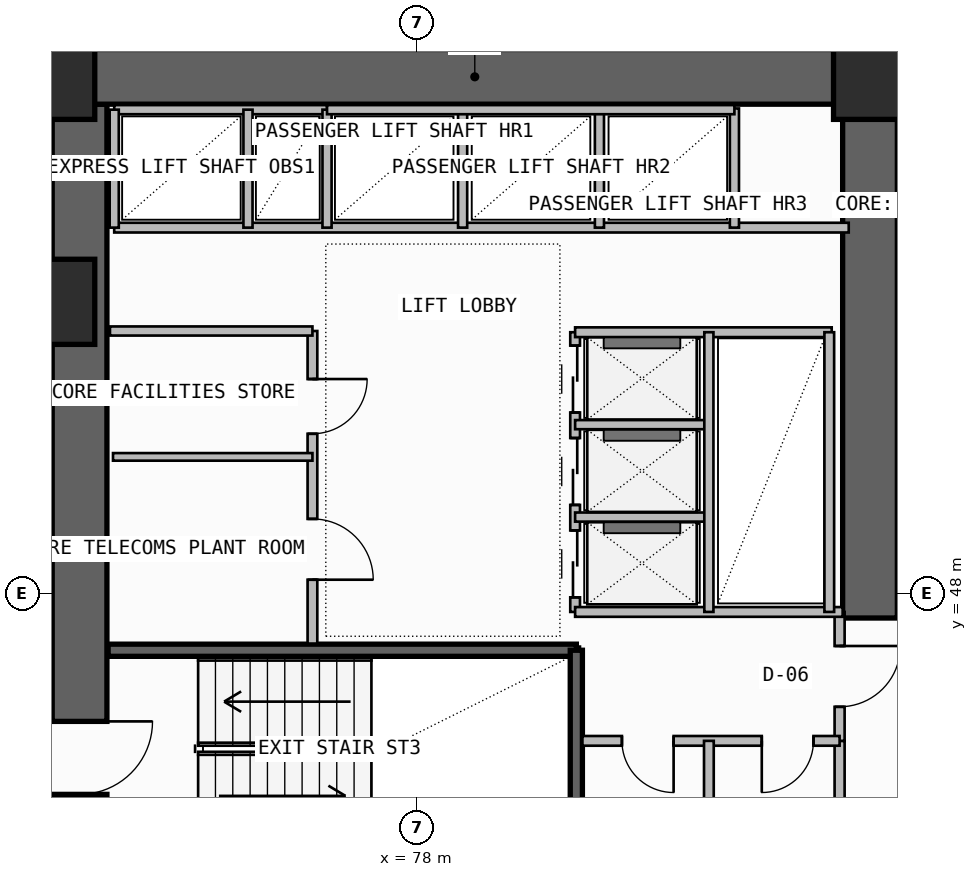
"""IFC4 building model, lengths in metres.
Left out: names, types, materials, properties, quantities, classifications, styles, units other than length and angle.
Written with IfcOpenShell. Run it as: python <this file> out.ifc"""

import sys

from ifc_helpers import new_model, si_unit, direction, frame, frame_2d, origin, origin_2d, place, context, subcontext, project, spatial, rectangle, extrude, element, fill, save


model = new_model("IFC4")
c1 = context("Model", 3, precision=1e-05, world=origin(), true_north=direction((0.0, 1.0)))
c2 = subcontext(c1, "Body", "Model", "MODEL_VIEW")
j1 = project(units=[si_unit("LENGTHUNIT", "METRE"), si_unit("PLANEANGLEUNIT", "RADIAN")], contexts=[c1])
p1 = place(None, origin())
s1 = spatial("IfcSite", under=j1, at=p1, CompositionType="ELEMENT")
p2 = place(p1, origin())
s2 = spatial("IfcBuilding", under=s1, at=p2, CompositionType="ELEMENT")
p3 = place(p2, frame((0.0, 0.0, 132.3)))
s3 = spatial("IfcBuildingStorey", under=s2, at=p3, CompositionType="ELEMENT", Elevation=132.3)
p4 = place(p3, frame((72.45, 43.35, -0.4), z_axis=(0.0, 0.0, 1.0), x_axis=(0.0, 1.0, 0.0)))
e1 = element("IfcWall", 1, at=p4, inside=s3, PredefinedType="SHEAR", context=c2, shape_type="SweptSolid", body=[
    extrude(rectangle(XDim=12.7, YDim=0.9, at=frame_2d((6.35, 0.0))), origin(), (0.0, 0.0, 1.0), 3.74),
])
p5 = place(p4, frame((1.35, 0.0, 0.4)))
e2 = element("IfcOpeningElement", 2, at=p5, cuts=e1, PredefinedType="OPENING", context=c2, shape_type="SweptSolid", body=[
    extrude(rectangle(XDim=1.2, YDim=2.2, at=frame_2d((0.6, 1.1))), frame((0.0, 0.46, 0.0), z_axis=(0.0, -1.0, 0.0), x_axis=(1.0, 0.0, 0.0)), (0.0, 0.0, 1.0), 0.92),
])
p6 = place(p3, frame((72.0, 56.5, -0.4), z_axis=(0.0, 0.0, 1.0), x_axis=(1.0, 0.0, 0.0)))
e3 = element("IfcWall", 3, at=p6, inside=s3, PredefinedType="SHEAR", context=c2, shape_type="SweptSolid", body=[
    extrude(rectangle(XDim=13.9, YDim=0.9, at=frame_2d((6.95, 0.0))), origin(), (0.0, 0.0, 1.0), 3.74),
])
p7 = place(p3, frame((85.45, 47.6, -0.4), z_axis=(0.0, 0.0, 1.0), x_axis=(0.0, 1.0, 0.0)))
e4 = element("IfcWall", 4, at=p7, inside=s3, PredefinedType="SHEAR", context=c2, shape_type="SweptSolid", body=[
    extrude(rectangle(XDim=8.45, YDim=0.9, at=frame_2d((4.225, 0.0))), origin(), (0.0, 0.0, 1.0), 3.74),
])
for number, where, z_axis, x_axis in (
    (5, (72.0, 52.8, 0.0), (0.0, 0.0, 1.0), (1.0, 0.0, 0.0)),
    (6, (72.0, 56.5, 0.0), (0.0, 0.0, 1.0), (1.0, 0.0, 0.0)),
    (7, (85.55, 56.5, 0.0), (0.0, 0.0, 1.0), (1.0, 0.0, 0.0)),
):
    element("IfcColumn", number, at=place(p3, frame(where, z_axis=z_axis, x_axis=x_axis)), inside=s3, PredefinedType="COLUMN", context=c2, shape_type="SweptSolid", body=[
        extrude(rectangle(XDim=1.4, YDim=1.4, at=origin_2d()), origin(), (0.0, 0.0, 1.0), 3.6),
    ])
p8 = place(p3, frame((72.92, 47.07, -0.4), z_axis=(0.0, 0.0, 1.0), x_axis=(1.0, 0.0, 0.0)))
e8 = element("IfcWall", 8, at=p8, inside=s3, PredefinedType="SOLIDWALL", context=c2, shape_type="SweptSolid", body=[
    extrude(rectangle(XDim=7.7, YDim=0.2, at=frame_2d((3.85, 0.0))), origin(), (0.0, 0.0, 1.0), 3.74),
])
p9 = place(p3, frame((80.62, 43.83, -0.4), z_axis=(0.0, 0.0, 1.0), x_axis=(0.0, 1.0, 0.0)))
e9 = element("IfcWall", 9, at=p9, inside=s3, PredefinedType="SOLIDWALL", context=c2, shape_type="SweptSolid", body=[
    extrude(rectangle(XDim=3.24, YDim=0.2, at=frame_2d((1.62, 0.0))), origin(), (0.0, 0.0, 1.0), 3.74),
])
p10 = place(p3, frame((84.95, 43.68, 0.0), z_axis=(0.0, 0.0, 1.0), x_axis=(0.0, 1.0, 0.0)))
e10 = element("IfcWall", 10, at=p10, inside=s3, PredefinedType="PLUMBINGWALL", context=c2, shape_type="SweptSolid", body=[
    extrude(rectangle(XDim=1.9, YDim=0.165, at=frame_2d((0.95, 0.0))), origin(), (0.0, 0.0, 1.0), 3.34),
])
p11 = place(p3, frame((84.95, 45.58, 0.0), z_axis=(0.0, 0.0, 1.0), x_axis=(0.0, 1.0, 0.0)))
e11 = element("IfcWall", 11, at=p11, inside=s3, PredefinedType="PARTITIONING", context=c2, shape_type="SweptSolid", body=[
    extrude(rectangle(XDim=2.12, YDim=0.165, at=frame_2d((1.06, 0.0))), origin(), (0.0, 0.0, 1.0), 3.34),
])
p12 = place(p11, frame((0.56, 0.0, 0.0)))
e12 = element("IfcOpeningElement", 12, at=p12, cuts=e11, PredefinedType="OPENING", context=c2, shape_type="SweptSolid", body=[
    extrude(rectangle(XDim=1.0, YDim=2.2, at=frame_2d((0.5, 1.1))), frame((0.0, 0.093, 0.0), z_axis=(0.0, -1.0, 0.0), x_axis=(1.0, 0.0, 0.0)), (0.0, 0.0, 1.0), 0.185),
])
p13 = place(p3, frame((80.72, 45.58, 0.0), z_axis=(0.0, 0.0, 1.0), x_axis=(1.0, 0.0, 0.0)))
e13 = element("IfcWall", 13, at=p13, inside=s3, PredefinedType="PLUMBINGWALL", context=c2, shape_type="SweptSolid", body=[
    extrude(rectangle(XDim=4.23, YDim=0.16, at=frame_2d((2.115, 0.0))), origin(), (0.0, 0.0, 1.0), 3.34),
])
p14 = place(p13, frame((0.65, 0.0, 0.0)))
e14 = element("IfcOpeningElement", 14, at=p14, cuts=e13, PredefinedType="OPENING", context=c2, shape_type="SweptSolid", body=[
    extrude(rectangle(XDim=0.85, YDim=2.05, at=frame_2d((0.425, 1.025))), frame((0.0, 0.09, 0.0), z_axis=(0.0, -1.0, 0.0), x_axis=(1.0, 0.0, 0.0)), (0.0, 0.0, 1.0), 0.18),
])
p15 = place(p13, frame((2.95, 0.0, 0.0)))
e15 = element("IfcOpeningElement", 15, at=p15, cuts=e13, PredefinedType="OPENING", context=c2, shape_type="SweptSolid", body=[
    extrude(rectangle(XDim=0.85, YDim=2.05, at=frame_2d((0.425, 1.025))), frame((0.0, 0.09, 0.0), z_axis=(0.0, -1.0, 0.0), x_axis=(1.0, 0.0, 0.0)), (0.0, 0.0, 1.0), 0.18),
])
p16 = place(p3, frame((82.8, 43.68, 0.0), z_axis=(0.0, 0.0, 1.0), x_axis=(0.0, 1.0, 0.0)))
e16 = element("IfcWall", 16, at=p16, inside=s3, PredefinedType="PLUMBINGWALL", context=c2, shape_type="SweptSolid", body=[
    extrude(rectangle(XDim=1.9, YDim=0.16, at=frame_2d((0.95, 0.0))), origin(), (0.0, 0.0, 1.0), 3.34),
])
p17 = place(p3, frame((76.28, 47.18, 0.0), z_axis=(0.0, 0.0, 1.0), x_axis=(0.0, 1.0, 0.0)))
e17 = element("IfcWall", 17, at=p17, inside=s3, PredefinedType="SOLIDWALL", context=c2, shape_type="SweptSolid", body=[
    extrude(rectangle(XDim=5.14, YDim=0.16, at=frame_2d((2.57, 0.0))), origin(), (0.0, 0.0, 1.0), 3.34),
])
p18 = place(p17, frame((1.05, 0.0, 0.0)))
e18 = element("IfcOpeningElement", 18, at=p18, cuts=e17, PredefinedType="OPENING", context=c2, shape_type="SweptSolid", body=[
    extrude(rectangle(XDim=1.0, YDim=2.2, at=frame_2d((0.5, 1.1))), frame((0.0, 0.09, 0.0), z_axis=(0.0, -1.0, 0.0), x_axis=(1.0, 0.0, 0.0)), (0.0, 0.0, 1.0), 0.18),
])
p19 = place(p17, frame((3.45, 0.0, 0.0)))
e19 = element("IfcOpeningElement", 19, at=p19, cuts=e17, PredefinedType="OPENING", context=c2, shape_type="SweptSolid", body=[
    extrude(rectangle(XDim=0.9, YDim=2.1, at=frame_2d((0.45, 1.05))), frame((0.0, 0.09, 0.0), z_axis=(0.0, -1.0, 0.0), x_axis=(1.0, 0.0, 0.0)), (0.0, 0.0, 1.0), 0.18),
])
p20 = place(p3, frame((72.95, 52.32, 0.0), z_axis=(0.0, 0.0, 1.0), x_axis=(1.0, 0.0, 0.0)))
e20 = element("IfcWall", 20, at=p20, inside=s3, PredefinedType="SOLIDWALL", context=c2, shape_type="SweptSolid", body=[
    extrude(rectangle(XDim=3.33, YDim=0.15, at=frame_2d((1.665, 0.0))), origin(), (0.0, 0.0, 1.0), 3.34),
])
p21 = place(p3, frame((73.0, 50.25, 0.0), z_axis=(0.0, 0.0, 1.0), x_axis=(1.0, 0.0, 0.0)))
e21 = element("IfcWall", 21, at=p21, inside=s3, PredefinedType="PARTITIONING", context=c2, shape_type="SweptSolid", body=[
    extrude(rectangle(XDim=3.28, YDim=0.125, at=frame_2d((1.64, 0.0))), origin(), (0.0, 0.0, 1.0), 3.34),
])
p22 = place(p3, frame((80.6, 47.7, 0.0), z_axis=(0.0, 0.0, 1.0), x_axis=(0.0, 1.0, 0.0)))
e22 = element("IfcWall", 22, at=p22, inside=s3, PredefinedType="SOLIDWALL", context=c2, shape_type="SweptSolid", body=[
    extrude(rectangle(XDim=4.6, YDim=0.16, at=frame_2d((2.3, 0.0))), origin(), (0.0, 0.0, 1.0), 3.34),
])
p23 = place(p22, frame((0.24, 0.0, 0.0)))
e23 = element("IfcOpeningElement", 23, at=p23, cuts=e22, PredefinedType="OPENING", context=c2, shape_type="SweptSolid", body=[
    extrude(rectangle(XDim=1.1, YDim=2.25, at=frame_2d((0.55, 1.125))), frame((0.0, 0.09, 0.0), z_axis=(0.0, -1.0, 0.0), x_axis=(1.0, 0.0, 0.0)), (0.0, 0.0, 1.0), 0.18),
])
p24 = place(p22, frame((1.76, 0.0, 0.0)))
e24 = element("IfcOpeningElement", 24, at=p24, cuts=e22, PredefinedType="OPENING", context=c2, shape_type="SweptSolid", body=[
    extrude(rectangle(XDim=1.1, YDim=2.25, at=frame_2d((0.55, 1.125))), frame((0.0, 0.09, 0.0), z_axis=(0.0, -1.0, 0.0), x_axis=(1.0, 0.0, 0.0)), (0.0, 0.0, 1.0), 0.18),
])
p25 = place(p22, frame((3.28, 0.0, 0.0)))
e25 = element("IfcOpeningElement", 25, at=p25, cuts=e22, PredefinedType="OPENING", context=c2, shape_type="SweptSolid", body=[
    extrude(rectangle(XDim=1.1, YDim=2.25, at=frame_2d((0.55, 1.125))), frame((0.0, 0.09, 0.0), z_axis=(0.0, -1.0, 0.0), x_axis=(1.0, 0.0, 0.0)), (0.0, 0.0, 1.0), 0.18),
])
p26 = place(p3, frame((80.6, 47.7, 0.0), z_axis=(0.0, 0.0, 1.0), x_axis=(1.0, 0.0, 0.0)))
e26 = element("IfcWall", 26, at=p26, inside=s3, PredefinedType="SOLIDWALL", context=c2, shape_type="SweptSolid", body=[
    extrude(rectangle(XDim=4.4, YDim=0.16, at=frame_2d((2.2, 0.0))), origin(), (0.0, 0.0, 1.0), 3.34),
])
p27 = place(p3, frame((80.6, 52.3, 0.0), z_axis=(0.0, 0.0, 1.0), x_axis=(1.0, 0.0, 0.0)))
e27 = element("IfcWall", 27, at=p27, inside=s3, PredefinedType="SOLIDWALL", context=c2, shape_type="SweptSolid", body=[
    extrude(rectangle(XDim=4.22, YDim=0.16, at=frame_2d((2.11, 0.0))), origin(), (0.0, 0.0, 1.0), 3.34),
])
for number, where, z_axis, x_axis in (
    (28, (80.6, 49.26, 0.0), (0.0, 0.0, 1.0), (1.0, 0.0, 0.0)),
    (29, (80.6, 50.78, 0.0), (0.0, 0.0, 1.0), (1.0, 0.0, 0.0)),
):
    element("IfcWall", number, at=place(p3, frame(where, z_axis=z_axis, x_axis=x_axis)), inside=s3, PredefinedType="PLUMBINGWALL", context=c2, shape_type="SweptSolid", body=[
        extrude(rectangle(XDim=2.2, YDim=0.15, at=frame_2d((1.1, 0.0))), origin(), (0.0, 0.0, 1.0), 3.34),
    ])
p28 = place(p3, frame((82.8, 47.7, 0.0), z_axis=(0.0, 0.0, 1.0), x_axis=(0.0, 1.0, 0.0)))
e30 = element("IfcWall", 30, at=p28, inside=s3, PredefinedType="PLUMBINGWALL", context=c2, shape_type="SweptSolid", body=[
    extrude(rectangle(XDim=4.6, YDim=0.15, at=frame_2d((2.3, 0.0))), origin(), (0.0, 0.0, 1.0), 3.34),
])
p29 = place(p3, frame((84.78, 47.7, 0.0), z_axis=(0.0, 0.0, 1.0), x_axis=(0.0, 1.0, 0.0)))
e31 = element("IfcWall", 31, at=p29, inside=s3, PredefinedType="SOLIDWALL", context=c2, shape_type="SweptSolid", body=[
    extrude(rectangle(XDim=4.6, YDim=0.16, at=frame_2d((2.3, 0.0))), origin(), (0.0, 0.0, 1.0), 3.34),
])
p30 = place(p3, frame((73.02, 54.02, 0.0), z_axis=(0.0, 0.0, 1.0), x_axis=(1.0, 0.0, 0.0)))
e32 = element("IfcWall", 32, at=p30, inside=s3, PredefinedType="SOLIDWALL", context=c2, shape_type="SweptSolid", body=[
    extrude(rectangle(XDim=12.08, YDim=0.16, at=frame_2d((6.04, 0.0))), origin(), (0.0, 0.0, 1.0), 3.34),
])
p31 = place(p3, frame((73.02, 55.96, 0.0), z_axis=(0.0, 0.0, 1.0), x_axis=(1.0, 0.0, 0.0)))
e33 = element("IfcWall", 33, at=p31, inside=s3, PredefinedType="SOLIDWALL", context=c2, shape_type="SweptSolid", body=[
    extrude(rectangle(XDim=3.5, YDim=0.15, at=frame_2d((1.75, 0.0))), origin(), (0.0, 0.0, 1.0), 3.34),
])
p32 = place(p3, frame((73.02, 54.02, 0.0), z_axis=(0.0, 0.0, 1.0), x_axis=(0.0, 1.0, 0.0)))
e34 = element("IfcWall", 34, at=p32, inside=s3, PredefinedType="PLUMBINGWALL", context=c2, shape_type="SweptSolid", body=[
    extrude(rectangle(XDim=1.94, YDim=0.15, at=frame_2d((0.97, 0.0))), origin(), (0.0, 0.0, 1.0), 3.34),
])
p33 = place(p3, frame((76.52, 54.02, 0.0), z_axis=(0.0, 0.0, 1.0), x_axis=(0.0, 1.0, 0.0)))
e35 = element("IfcWall", 35, at=p33, inside=s3, PredefinedType="SOLIDWALL", context=c2, shape_type="SweptSolid", body=[
    extrude(rectangle(XDim=1.94, YDim=0.15, at=frame_2d((0.97, 0.0))), origin(), (0.0, 0.0, 1.0), 3.34),
])
p34 = place(p3, frame((75.22, 54.02, 0.0), z_axis=(0.0, 0.0, 1.0), x_axis=(0.0, 1.0, 0.0)))
e36 = element("IfcWall", 36, at=p34, inside=s3, PredefinedType="PLUMBINGWALL", context=c2, shape_type="SweptSolid", body=[
    extrude(rectangle(XDim=1.94, YDim=0.15, at=frame_2d((0.97, 0.0))), origin(), (0.0, 0.0, 1.0), 3.34),
])
for number, where, z_axis, x_axis in (
    (37, (78.75, 54.02, 0.0), (0.0, 0.0, 1.0), (0.0, 1.0, 0.0)),
    (38, (81.0, 54.02, 0.0), (0.0, 0.0, 1.0), (0.0, 1.0, 0.0)),
):
    element("IfcWall", number, at=place(p3, frame(where, z_axis=z_axis, x_axis=x_axis)), inside=s3, PredefinedType="PLUMBINGWALL", context=c2, shape_type="SweptSolid", body=[
        extrude(rectangle(XDim=1.96, YDim=0.15, at=frame_2d((0.98, 0.0))), origin(), (0.0, 0.0, 1.0), 3.34),
    ])
p35 = place(p3, frame((83.22, 54.02, 0.0), z_axis=(0.0, 0.0, 1.0), x_axis=(0.0, 1.0, 0.0)))
e39 = element("IfcWall", 39, at=p35, inside=s3, PredefinedType="SOLIDWALL", context=c2, shape_type="SweptSolid", body=[
    extrude(rectangle(XDim=1.96, YDim=0.15, at=frame_2d((0.98, 0.0))), origin(), (0.0, 0.0, 1.0), 3.34),
])
p36 = place(p3, frame((76.52, 55.96, 0.0), z_axis=(0.0, 0.0, 1.0), x_axis=(1.0, 0.0, 0.0)))
e40 = element("IfcWall", 40, at=p36, inside=s3, PredefinedType="SOLIDWALL", context=c2, shape_type="SweptSolid", body=[
    extrude(rectangle(XDim=6.7, YDim=0.15, at=frame_2d((3.35, 0.0))), origin(), (0.0, 0.0, 1.0), 3.34),
])
p37 = place(p5, frame((1.2, 0.0, 0.0), z_axis=(0.0, 0.0, 1.0), x_axis=(-1.0, 0.0, 0.0)))
e41 = element("IfcDoor", 41, at=p37, inside=s3, OperationType="SINGLE_SWING_LEFT", PredefinedType="USERDEFINED", context=c2, shape_type="SweptSolid", body=[
    extrude(rectangle(XDim=1.2, YDim=2.2, at=frame_2d((0.6, 1.1))), frame((0.0, 0.025, 0.0), z_axis=(0.0, -1.0, 0.0), x_axis=(1.0, 0.0, 0.0)), (0.0, 0.0, 1.0), 0.05),
])
fill(e2, e41)
p38 = place(p12, frame((1.0, 0.0, 0.0), z_axis=(0.0, 0.0, 1.0), x_axis=(-1.0, 0.0, 0.0)))
e42 = element("IfcDoor", 42, at=p38, inside=s3, OperationType="SINGLE_SWING_LEFT", PredefinedType="DOOR", context=c2, shape_type="SweptSolid", body=[
    extrude(rectangle(XDim=1.0, YDim=2.2, at=frame_2d((0.5, 1.1))), frame((0.0, 0.025, 0.0), z_axis=(0.0, -1.0, 0.0), x_axis=(1.0, 0.0, 0.0)), (0.0, 0.0, 1.0), 0.05),
])
fill(e12, e42)
p39 = place(p14, frame((0.85, 0.0, 0.0), z_axis=(0.0, 0.0, 1.0), x_axis=(-1.0, 0.0, 0.0)))
e43 = element("IfcDoor", 43, at=p39, inside=s3, OperationType="SINGLE_SWING_LEFT", PredefinedType="DOOR", context=c2, shape_type="SweptSolid", body=[
    extrude(rectangle(XDim=0.85, YDim=2.05, at=frame_2d((0.425, 1.025))), frame((0.0, 0.025, 0.0), z_axis=(0.0, -1.0, 0.0), x_axis=(1.0, 0.0, 0.0)), (0.0, 0.0, 1.0), 0.05),
])
fill(e14, e43)
p40 = place(p15, frame((0.85, 0.0, 0.0), z_axis=(0.0, 0.0, 1.0), x_axis=(-1.0, 0.0, 0.0)))
e44 = element("IfcDoor", 44, at=p40, inside=s3, OperationType="SINGLE_SWING_RIGHT", PredefinedType="DOOR", context=c2, shape_type="SweptSolid", body=[
    extrude(rectangle(XDim=0.85, YDim=2.05, at=frame_2d((0.425, 1.025))), frame((0.0, 0.025, 0.0), z_axis=(0.0, -1.0, 0.0), x_axis=(1.0, 0.0, 0.0)), (0.0, 0.0, 1.0), 0.05),
])
fill(e15, e44)
p41 = place(p18, frame((1.0, 0.0, 0.0), z_axis=(0.0, 0.0, 1.0), x_axis=(-1.0, 0.0, 0.0)))
e45 = element("IfcDoor", 45, at=p41, inside=s3, OperationType="SINGLE_SWING_RIGHT", PredefinedType="DOOR", context=c2, shape_type="SweptSolid", body=[
    extrude(rectangle(XDim=1.0, YDim=2.2, at=frame_2d((0.5, 1.1))), frame((0.0, 0.025, 0.0), z_axis=(0.0, -1.0, 0.0), x_axis=(1.0, 0.0, 0.0)), (0.0, 0.0, 1.0), 0.05),
])
fill(e18, e45)
p42 = place(p19, frame((0.9, 0.0, 0.0), z_axis=(0.0, 0.0, 1.0), x_axis=(-1.0, 0.0, 0.0)))
e46 = element("IfcDoor", 46, at=p42, inside=s3, OperationType="SINGLE_SWING_LEFT", PredefinedType="DOOR", context=c2, shape_type="SweptSolid", body=[
    extrude(rectangle(XDim=0.9, YDim=2.1, at=frame_2d((0.45, 1.05))), frame((0.0, 0.025, 0.0), z_axis=(0.0, -1.0, 0.0), x_axis=(1.0, 0.0, 0.0)), (0.0, 0.0, 1.0), 0.05),
])
fill(e19, e46)
p43 = place(p23, frame((1.1, 0.0, 0.0), z_axis=(0.0, 0.0, 1.0), x_axis=(-1.0, 0.0, 0.0)))
e47 = element("IfcDoor", 47, at=p43, inside=s3, OperationType="DOUBLE_DOOR_SLIDING", PredefinedType="DOOR", context=c2, shape_type="SweptSolid", body=[
    extrude(rectangle(XDim=1.1, YDim=2.25, at=frame_2d((0.55, 1.125))), frame((0.0, 0.025, 0.0), z_axis=(0.0, -1.0, 0.0), x_axis=(1.0, 0.0, 0.0)), (0.0, 0.0, 1.0), 0.05),
])
fill(e23, e47)
p44 = place(p24, frame((1.1, 0.0, 0.0), z_axis=(0.0, 0.0, 1.0), x_axis=(-1.0, 0.0, 0.0)))
e48 = element("IfcDoor", 48, at=p44, inside=s3, OperationType="DOUBLE_DOOR_SLIDING", PredefinedType="DOOR", context=c2, shape_type="SweptSolid", body=[
    extrude(rectangle(XDim=1.1, YDim=2.25, at=frame_2d((0.55, 1.125))), frame((0.0, 0.025, 0.0), z_axis=(0.0, -1.0, 0.0), x_axis=(1.0, 0.0, 0.0)), (0.0, 0.0, 1.0), 0.05),
])
fill(e24, e48)
p45 = place(p25, frame((1.1, 0.0, 0.0), z_axis=(0.0, 0.0, 1.0), x_axis=(-1.0, 0.0, 0.0)))
e49 = element("IfcDoor", 49, at=p45, inside=s3, OperationType="DOUBLE_DOOR_SLIDING", PredefinedType="DOOR", context=c2, shape_type="SweptSolid", body=[
    extrude(rectangle(XDim=1.1, YDim=2.25, at=frame_2d((0.55, 1.125))), frame((0.0, 0.025, 0.0), z_axis=(0.0, -1.0, 0.0), x_axis=(1.0, 0.0, 0.0)), (0.0, 0.0, 1.0), 0.05),
])
fill(e25, e49)
save(model, sys.argv[1])
